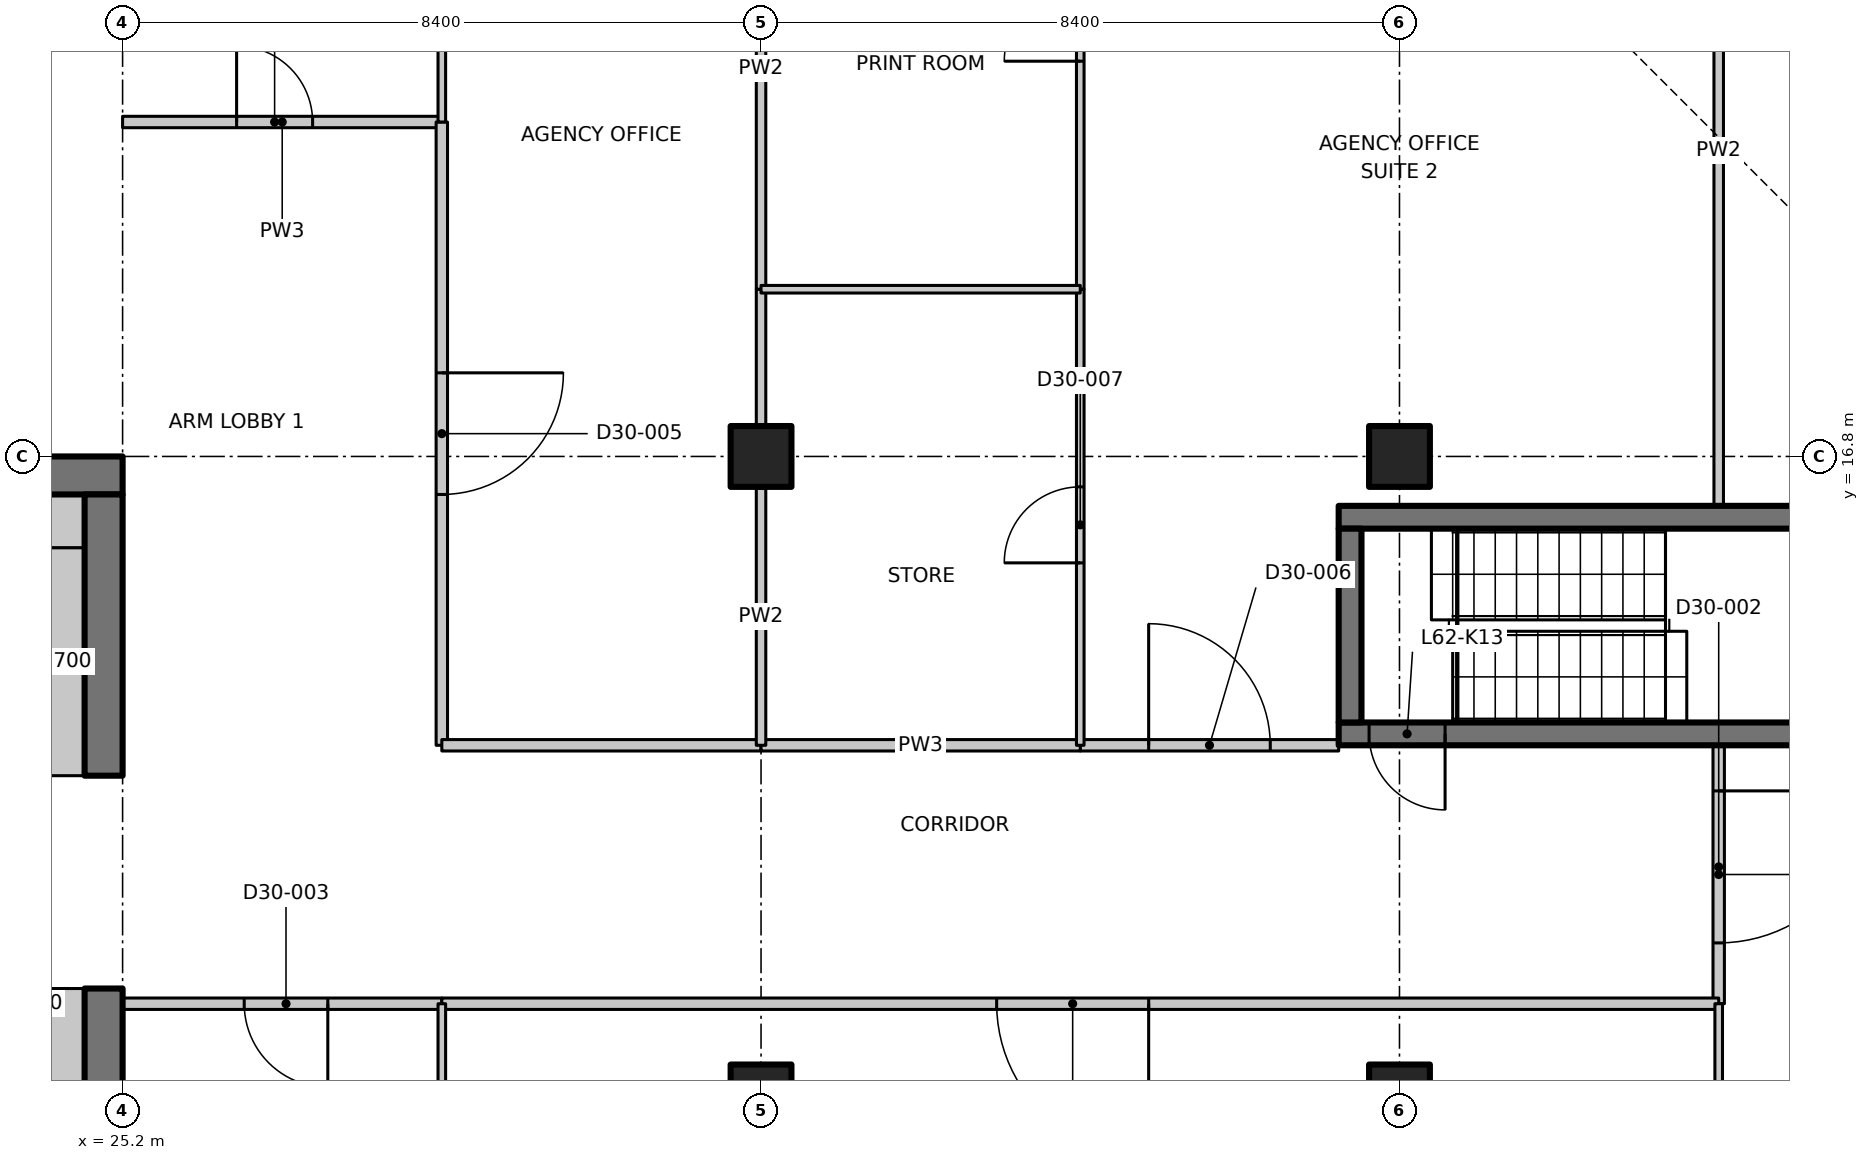
"""IFC4 building model, lengths in metres.
Left out: names, types, materials, properties, quantities, classifications, styles, units other than length and angle.
Written with IfcOpenShell. Run it as: python <this file> out.ifc"""

import sys

from ifc_helpers import new_model, si_unit, direction, frame, frame_2d, origin, origin_2d, place, context, subcontext, project, spatial, polyline, rectangle, outline, extrude, element, fill, save


model = new_model("IFC4")
c1 = context("Model", 3, precision=1e-05, world=origin(), true_north=direction((0.0, 1.0)))
c2 = subcontext(c1, "Body", "Model", "MODEL_VIEW")
j1 = project(units=[si_unit("LENGTHUNIT", "METRE"), si_unit("PLANEANGLEUNIT", "RADIAN")], contexts=[c1])
p1 = place(None, origin())
s1 = spatial("IfcSite", under=j1, at=p1, CompositionType="ELEMENT")
p2 = place(p1, origin())
s2 = spatial("IfcBuilding", under=s1, at=p2, CompositionType="ELEMENT")
p3 = place(p2, frame((0.0, 0.0, 244.5)))
s3 = spatial("IfcBuildingStorey", under=s2, at=p3, CompositionType="ELEMENT", Elevation=244.5)
for number, where, z_axis, x_axis in (
    (1, (33.6, 8.4, 0.0), (0.0, 0.0, 1.0), (1.0, 0.0, 0.0)),
    (2, (33.6, 16.8, 0.0), (0.0, 0.0, 1.0), (1.0, 0.0, 0.0)),
    (3, (42.0, 8.4, 0.0), (0.0, 0.0, 1.0), (1.0, 0.0, 0.0)),
    (4, (42.0, 16.8, 0.0), (0.0, 0.0, 1.0), (1.0, 0.0, 0.0)),
):
    element("IfcColumn", number, at=place(p3, frame(where, z_axis=z_axis, x_axis=x_axis)), inside=s3, PredefinedType="COLUMN", context=c2, shape_type="SweptSolid", body=[
        extrude(rectangle(XDim=0.8, YDim=0.8, at=origin_2d()), origin(), (0.0, 0.0, 1.0), 3.35),
    ])
p4 = place(p3, frame((23.8, 16.55, 0.0), z_axis=(0.0, 0.0, 1.0), x_axis=(1.0, 0.0, 0.0)))
e5 = element("IfcWall", 5, at=p4, inside=s3, PredefinedType="SHEAR", context=c2, shape_type="SweptSolid", body=[
    extrude(rectangle(XDim=1.4, YDim=0.5, at=frame_2d((0.7, 0.0))), origin(), (0.0, 0.0, 1.0), 3.35),
])
p5 = place(p3, frame((24.95, 0.5, 0.0), z_axis=(0.0, 0.0, 1.0), x_axis=(0.0, 1.0, 0.0)))
e6 = element("IfcWall", 6, at=p5, inside=s3, PredefinedType="SHEAR", context=c2, shape_type="SweptSolid", body=[
    extrude(rectangle(XDim=9.3, YDim=0.5, at=frame_2d((4.65, 0.0))), origin(), (0.0, 0.0, 1.0), 3.35),
])
p6 = place(p3, frame((24.95, 12.6, 0.0), z_axis=(0.0, 0.0, 1.0), x_axis=(0.0, 1.0, 0.0)))
e7 = element("IfcWall", 7, at=p6, inside=s3, PredefinedType="SHEAR", context=c2, shape_type="SweptSolid", body=[
    extrude(rectangle(XDim=3.7, YDim=0.5, at=frame_2d((1.85, 0.0))), origin(), (0.0, 0.0, 1.0), 3.35),
])
p7 = place(p3, frame((24.35, 12.6, 0.0), z_axis=(0.0, 0.0, 1.0), x_axis=(0.0, 1.0, 0.0)))
e8 = element("IfcWall", 8, at=p7, inside=s3, PredefinedType="PARTITIONING", context=c2, shape_type="SweptSolid", body=[
    extrude(rectangle(XDim=3.0, YDim=0.7, at=frame_2d((1.5, 0.0))), origin(), (0.0, 0.0, 1.0), 3.35),
])
p8 = place(p3, frame((23.8, 15.95, 0.0), z_axis=(0.0, 0.0, 1.0), x_axis=(1.0, 0.0, 0.0)))
e9 = element("IfcWall", 9, at=p8, inside=s3, PredefinedType="PARTITIONING", context=c2, shape_type="SweptSolid", body=[
    extrude(rectangle(XDim=0.9, YDim=0.7, at=frame_2d((0.45, 0.0))), origin(), (0.0, 0.0, 1.0), 3.35),
])
p9 = place(p3, frame((49.4, 13.15, 0.0), z_axis=(0.0, 0.0, 1.0), x_axis=(-1.0, 0.0, 0.0)))
e10 = element("IfcWall", 10, at=p9, inside=s3, PredefinedType="SHEAR", context=c2, shape_type="SweptSolid", body=[
    extrude(rectangle(XDim=8.2, YDim=0.3, at=frame_2d((4.1, 0.0))), origin(), (0.0, 0.0, 1.0), 3.35),
])
p10 = place(p9, frame((6.8, 0.0, 0.0)))
e11 = element("IfcOpeningElement", 11, at=p10, cuts=e10, PredefinedType="OPENING", context=c2, shape_type="SweptSolid", body=[
    extrude(rectangle(XDim=1.0, YDim=2.1, at=frame_2d((0.5, 1.05))), frame((0.0, 0.16, 0.0), z_axis=(0.0, -1.0, 0.0), x_axis=(1.0, 0.0, 0.0)), (0.0, 0.0, 1.0), 0.32),
])
p11 = place(p3, frame((41.2, 16.0, 0.0), z_axis=(0.0, 0.0, 1.0), x_axis=(1.0, 0.0, 0.0)))
e12 = element("IfcWall", 12, at=p11, inside=s3, PredefinedType="SHEAR", context=c2, shape_type="SweptSolid", body=[
    extrude(rectangle(XDim=8.2, YDim=0.3, at=frame_2d((4.1, 0.0))), origin(), (0.0, 0.0, 1.0), 3.35),
])
p12 = place(p3, frame((41.35, 13.3, 0.0), z_axis=(0.0, 0.0, 1.0), x_axis=(0.0, 1.0, 0.0)))
e13 = element("IfcWall", 13, at=p12, inside=s3, PredefinedType="SHEAR", context=c2, shape_type="SweptSolid", body=[
    extrude(rectangle(XDim=2.55, YDim=0.3, at=frame_2d((1.275, 0.0))), origin(), (0.0, 0.0, 1.0), 3.35),
])
p13 = place(p3, frame((24.35, 4.35, 0.0), z_axis=(0.0, 0.0, 1.0), x_axis=(0.0, 1.0, 0.0)))
e14 = element("IfcWall", 14, at=p13, inside=s3, PredefinedType="PARTITIONING", context=c2, shape_type="SweptSolid", body=[
    extrude(rectangle(XDim=5.45, YDim=0.7, at=frame_2d((2.725, 0.0))), origin(), (0.0, 0.0, 1.0), 3.35),
])
p14 = place(p3, frame((25.2, 21.2, 0.0), z_axis=(0.0, 0.0, 1.0), x_axis=(1.0, 0.0, 0.0)))
e15 = element("IfcWall", 15, at=p14, inside=s3, PredefinedType="PARTITIONING", context=c2, shape_type="SweptSolid", body=[
    extrude(rectangle(XDim=4.2, YDim=0.15, at=frame_2d((2.1, 0.0))), origin(), (0.0, 0.0, 1.0), 3.33),
])
p15 = place(p14, frame((1.5, 0.0, 0.0)))
e16 = element("IfcOpeningElement", 16, at=p15, cuts=e15, PredefinedType="OPENING", context=c2, shape_type="SweptSolid", body=[
    extrude(rectangle(XDim=1.0, YDim=2.1, at=frame_2d((0.5, 1.05))), frame((0.0, 0.085, 0.0), z_axis=(0.0, -1.0, 0.0), x_axis=(1.0, 0.0, 0.0)), (0.0, 0.0, 1.0), 0.17),
])
p16 = place(p3, frame((29.4, 9.6, 0.0), z_axis=(0.0, 0.0, 1.0), x_axis=(-1.0, 0.0, 0.0)))
e17 = element("IfcWall", 17, at=p16, inside=s3, PredefinedType="PARTITIONING", context=c2, shape_type="SweptSolid", body=[
    extrude(rectangle(XDim=4.2, YDim=0.15, at=frame_2d((2.1, 0.0))), origin(), (0.0, 0.0, 1.0), 3.33),
])
p17 = place(p16, frame((1.5, 0.0, 0.0)))
e18 = element("IfcOpeningElement", 18, at=p17, cuts=e17, PredefinedType="OPENING", context=c2, shape_type="SweptSolid", body=[
    extrude(rectangle(XDim=1.1, YDim=2.1, at=frame_2d((0.55, 1.05))), frame((0.0, 0.085, 0.0), z_axis=(0.0, -1.0, 0.0), x_axis=(1.0, 0.0, 0.0)), (0.0, 0.0, 1.0), 0.17),
])
p18 = place(p3, frame((29.4, 21.2, 0.0), z_axis=(0.0, 0.0, 1.0), x_axis=(0.0, -1.0, 0.0)))
e19 = element("IfcWall", 19, at=p18, inside=s3, PredefinedType="PARTITIONING", context=c2, shape_type="SweptSolid", body=[
    extrude(rectangle(XDim=8.2, YDim=0.15, at=frame_2d((4.1, 0.0))), origin(), (0.0, 0.0, 1.0), 3.33),
])
p19 = place(p18, frame((3.3, 0.0, 0.0)))
e20 = element("IfcOpeningElement", 20, at=p19, cuts=e19, PredefinedType="OPENING", context=c2, shape_type="SweptSolid", body=[
    extrude(rectangle(XDim=1.6, YDim=2.1, at=frame_2d((0.8, 1.05))), frame((0.0, 0.085, 0.0), z_axis=(0.0, -1.0, 0.0), x_axis=(1.0, 0.0, 0.0)), (0.0, 0.0, 1.0), 0.17),
])
p20 = place(p3, frame((29.4, 27.429, 0.0), z_axis=(0.0, 0.0, 1.0), x_axis=(0.0, -1.0, 0.0)))
e21 = element("IfcWall", 21, at=p20, inside=s3, PredefinedType="PARTITIONING", context=c2, shape_type="SweptSolid", body=[
    extrude(outline(polyline([(0.0, 0.0), (6.229, 0.0), (6.229, 3.33), (2.679, 3.33), (2.677, 2.98), (1.781, 2.98), (1.779, 3.33), (0.154, 3.33), (0.0, 3.33), (0.0, 0.0)])), frame((0.0, 0.05, 0.0), z_axis=(0.0, -1.0, 0.0), x_axis=(1.0, 0.0, 0.0)), (0.0, 0.0, 1.0), 0.1),
])
p21 = place(p3, frame((46.2, 13.0, 0.0), z_axis=(0.0, 0.0, 1.0), x_axis=(0.0, -1.0, 0.0)))
e22 = element("IfcWall", 22, at=p21, inside=s3, PredefinedType="PARTITIONING", context=c2, shape_type="SweptSolid", body=[
    extrude(rectangle(XDim=3.4, YDim=0.15, at=frame_2d((1.7, 0.0))), origin(), (0.0, 0.0, 1.0), 3.33),
])
p22 = place(p21, frame((0.6, 0.0, 0.0)))
e23 = element("IfcOpeningElement", 23, at=p22, cuts=e22, PredefinedType="OPENING", context=c2, shape_type="SweptSolid", body=[
    extrude(rectangle(XDim=2.0, YDim=2.4, at=frame_2d((1.0, 1.2))), frame((0.0, 0.085, 0.0), z_axis=(0.0, -1.0, 0.0), x_axis=(1.0, 0.0, 0.0)), (0.0, 0.0, 1.0), 0.17),
])
p23 = place(p3, frame((46.2, 9.6, 0.0), z_axis=(0.0, 0.0, 1.0), x_axis=(-1.0, 0.0, 0.0)))
e24 = element("IfcWall", 24, at=p23, inside=s3, PredefinedType="PARTITIONING", context=c2, shape_type="SweptSolid", body=[
    extrude(rectangle(XDim=16.8, YDim=0.15, at=frame_2d((8.4, 0.0))), origin(), (0.0, 0.0, 1.0), 3.33),
])
p24 = place(p23, frame((7.5, 0.0, 0.0)))
e25 = element("IfcOpeningElement", 25, at=p24, cuts=e24, PredefinedType="OPENING", context=c2, shape_type="SweptSolid", body=[
    extrude(rectangle(XDim=2.0, YDim=2.4, at=frame_2d((1.0, 1.2))), frame((0.0, 0.085, 0.0), z_axis=(0.0, -1.0, 0.0), x_axis=(1.0, 0.0, 0.0)), (0.0, 0.0, 1.0), 0.17),
])
p25 = place(p3, frame((29.4, 13.0, 0.0), z_axis=(0.0, 0.0, 1.0), x_axis=(1.0, 0.0, 0.0)))
e26 = element("IfcWall", 26, at=p25, inside=s3, PredefinedType="PARTITIONING", context=c2, shape_type="SweptSolid", body=[
    extrude(rectangle(XDim=4.2, YDim=0.15, at=frame_2d((2.1, 0.0))), origin(), (0.0, 0.0, 1.0), 3.33),
])
p26 = place(p3, frame((37.8, 13.0, 0.0), z_axis=(0.0, 0.0, 1.0), x_axis=(1.0, 0.0, 0.0)))
e27 = element("IfcWall", 27, at=p26, inside=s3, PredefinedType="PARTITIONING", context=c2, shape_type="SweptSolid", body=[
    extrude(rectangle(XDim=3.4, YDim=0.15, at=frame_2d((1.7, 0.0))), origin(), (0.0, 0.0, 1.0), 3.33),
])
p27 = place(p26, frame((0.9, 0.0, 0.0)))
e28 = element("IfcOpeningElement", 28, at=p27, cuts=e27, PredefinedType="OPENING", context=c2, shape_type="SweptSolid", body=[
    extrude(rectangle(XDim=1.6, YDim=2.1, at=frame_2d((0.8, 1.05))), frame((0.0, 0.085, 0.0), z_axis=(0.0, -1.0, 0.0), x_axis=(1.0, 0.0, 0.0)), (0.0, 0.0, 1.0), 0.17),
])
p28 = place(p3, frame((33.6, 13.0, 0.0), z_axis=(0.0, 0.0, 1.0), x_axis=(1.0, 0.0, 0.0)))
e29 = element("IfcWall", 29, at=p28, inside=s3, PredefinedType="PARTITIONING", context=c2, shape_type="SweptSolid", body=[
    extrude(rectangle(XDim=4.2, YDim=0.15, at=frame_2d((2.1, 0.0))), origin(), (0.0, 0.0, 1.0), 3.33),
])
p29 = place(p3, frame((46.2, -0.2, 0.0), z_axis=(0.0, 0.0, 1.0), x_axis=(0.0, 1.0, 0.0)))
e30 = element("IfcWall", 30, at=p29, inside=s3, PredefinedType="PARTITIONING", context=c2, shape_type="SweptSolid", body=[
    extrude(outline(polyline([(0.0, 0.0), (9.8, 0.0), (9.8, 3.33), (5.066, 3.33), (5.064, 2.98), (3.736, 2.98), (3.734, 3.33), (0.0, 3.33), (0.0, 0.0)])), frame((0.0, 0.05, 0.0), z_axis=(0.0, -1.0, 0.0), x_axis=(1.0, 0.0, 0.0)), (0.0, 0.0, 1.0), 0.1),
])
p30 = place(p3, frame((46.2, 16.15, 0.0), z_axis=(0.0, 0.0, 1.0), x_axis=(0.0, 1.0, 0.0)))
e31 = element("IfcWall", 31, at=p30, inside=s3, PredefinedType="PARTITIONING", context=c2, shape_type="SweptSolid", body=[
    extrude(outline(polyline([(0.0, 0.0), (9.353, 0.0), (9.353, 3.33), (9.25, 3.33), (5.528, 3.33), (5.526, 2.98), (4.174, 2.98), (4.172, 3.33), (0.0, 3.33), (0.0, 0.0)])), frame((0.0, 0.062, 0.0), z_axis=(0.0, -1.0, 0.0), x_axis=(1.0, 0.0, 0.0)), (0.0, 0.0, 1.0), 0.125),
])
p31 = place(p3, frame((29.4, 9.6, 0.0), z_axis=(0.0, 0.0, 1.0), x_axis=(0.0, -1.0, 0.0)))
e32 = element("IfcWall", 32, at=p31, inside=s3, PredefinedType="PARTITIONING", context=c2, shape_type="SweptSolid", body=[
    extrude(outline(polyline([(0.0, 0.0), (12.6, 0.0), (12.6, 3.33), (10.05, 3.33), (10.048, 2.98), (9.152, 2.98), (9.15, 3.33), (0.0, 3.33), (0.0, 0.0)])), frame((0.0, 0.05, 0.0), z_axis=(0.0, -1.0, 0.0), x_axis=(1.0, 0.0, 0.0)), (0.0, 0.0, 1.0), 0.1),
])
p32 = place(p3, frame((33.6, 19.0, 0.0), z_axis=(0.0, 0.0, 1.0), x_axis=(0.0, -1.0, 0.0)))
e33 = element("IfcWall", 33, at=p32, inside=s3, PredefinedType="PARTITIONING", context=c2, shape_type="SweptSolid", body=[
    extrude(rectangle(XDim=1.78, YDim=0.125, at=frame_2d((0.89, 0.0))), origin(), (0.0, 0.0, 1.0), 3.33),
])
p33 = place(p3, frame((33.6, 16.38, 0.0), z_axis=(0.0, 0.0, 1.0), x_axis=(0.0, -1.0, 0.0)))
e34 = element("IfcWall", 34, at=p33, inside=s3, PredefinedType="PARTITIONING", context=c2, shape_type="SweptSolid", body=[
    extrude(rectangle(XDim=3.38, YDim=0.125, at=frame_2d((1.69, 0.0))), origin(), (0.0, 0.0, 1.0), 3.33),
])
p34 = place(p3, frame((33.6, 24.805, 0.0), z_axis=(0.0, 0.0, 1.0), x_axis=(0.0, -1.0, 0.0)))
e35 = element("IfcWall", 35, at=p34, inside=s3, PredefinedType="PARTITIONING", context=c2, shape_type="SweptSolid", body=[
    extrude(outline(polyline([(0.0, 0.0), (5.805, 0.0), (5.805, 3.33), (0.055, 3.33), (0.053, 2.98), (0.0, 2.98), (0.0, 0.0)])), frame((0.0, 0.062, 0.0), z_axis=(0.0, -1.0, 0.0), x_axis=(1.0, 0.0, 0.0)), (0.0, 0.0, 1.0), 0.125),
])
p35 = place(p3, frame((37.8, 13.0, 0.0), z_axis=(0.0, 0.0, 1.0), x_axis=(0.0, 1.0, 0.0)))
e36 = element("IfcWall", 36, at=p35, inside=s3, PredefinedType="PARTITIONING", context=c2, shape_type="SweptSolid", body=[
    extrude(rectangle(XDim=6.0, YDim=0.1, at=frame_2d((3.0, 0.0))), origin(), (0.0, 0.0, 1.0), 3.33),
])
p36 = place(p35, frame((2.4, 0.0, 0.0)))
e37 = element("IfcOpeningElement", 37, at=p36, cuts=e36, PredefinedType="OPENING", context=c2, shape_type="SweptSolid", body=[
    extrude(rectangle(XDim=1.0, YDim=2.1, at=frame_2d((0.5, 1.05))), frame((0.0, 0.06, 0.0), z_axis=(0.0, -1.0, 0.0), x_axis=(1.0, 0.0, 0.0)), (0.0, 0.0, 1.0), 0.12),
])
p37 = place(p3, frame((37.8, 19.0, 0.0), z_axis=(0.0, 0.0, 1.0), x_axis=(0.0, 1.0, 0.0)))
e38 = element("IfcWall", 38, at=p37, inside=s3, PredefinedType="PARTITIONING", context=c2, shape_type="SweptSolid", body=[
    extrude(outline(polyline([(0.0, 0.0), (7.2, 0.0), (7.2, 3.33), (6.65, 3.33), (6.648, 2.98), (5.752, 2.98), (5.75, 3.33), (0.0, 3.33), (0.0, 0.0)])), frame((0.0, 0.05, 0.0), z_axis=(0.0, -1.0, 0.0), x_axis=(1.0, 0.0, 0.0)), (0.0, 0.0, 1.0), 0.1),
])
p38 = place(p37, frame((3.0, 0.0, 0.0)))
e39 = element("IfcOpeningElement", 39, at=p38, cuts=e38, PredefinedType="OPENING", context=c2, shape_type="SweptSolid", body=[
    extrude(rectangle(XDim=1.0, YDim=2.1, at=frame_2d((0.5, 1.05))), frame((0.0, 0.06, 0.0), z_axis=(0.0, -1.0, 0.0), x_axis=(1.0, 0.0, 0.0)), (0.0, 0.0, 1.0), 0.12),
])
p39 = place(p3, frame((33.6, 19.0, 0.0), z_axis=(0.0, 0.0, 1.0), x_axis=(1.0, 0.0, 0.0)))
e40 = element("IfcWall", 40, at=p39, inside=s3, PredefinedType="PARTITIONING", context=c2, shape_type="SweptSolid", body=[
    extrude(rectangle(XDim=4.2, YDim=0.1, at=frame_2d((2.1, 0.0))), origin(), (0.0, 0.0, 1.0), 3.33),
])
p40 = place(p10, origin())
e41 = element("IfcDoor", 41, at=p40, inside=s3, OperationType="SINGLE_SWING_LEFT", PredefinedType="DOOR", context=c2, shape_type="SweptSolid", body=[
    extrude(rectangle(XDim=1.0, YDim=2.1, at=frame_2d((0.5, 1.05))), frame((0.0, 0.025, 0.0), z_axis=(0.0, -1.0, 0.0), x_axis=(1.0, 0.0, 0.0)), (0.0, 0.0, 1.0), 0.05),
])
fill(e11, e41)
p41 = place(p15, origin())
e42 = element("IfcDoor", 42, at=p41, inside=s3, OperationType="SINGLE_SWING_LEFT", PredefinedType="DOOR", context=c2, shape_type="SweptSolid", body=[
    extrude(rectangle(XDim=1.0, YDim=2.1, at=frame_2d((0.5, 1.05))), frame((0.0, 0.025, 0.0), z_axis=(0.0, -1.0, 0.0), x_axis=(1.0, 0.0, 0.0)), (0.0, 0.0, 1.0), 0.05),
])
fill(e16, e42)
p42 = place(p22, origin())
e43 = element("IfcDoor", 43, at=p42, inside=s3, OperationType="DOUBLE_DOOR_SINGLE_SWING", PredefinedType="DOOR", context=c2, shape_type="SweptSolid", body=[
    extrude(rectangle(XDim=2.0, YDim=2.4, at=frame_2d((1.0, 1.2))), frame((0.0, 0.025, 0.0), z_axis=(0.0, -1.0, 0.0), x_axis=(1.0, 0.0, 0.0)), (0.0, 0.0, 1.0), 0.05),
])
fill(e23, e43)
p43 = place(p17, origin())
e44 = element("IfcDoor", 44, at=p43, inside=s3, OperationType="SINGLE_SWING_LEFT", PredefinedType="DOOR", context=c2, shape_type="SweptSolid", body=[
    extrude(rectangle(XDim=1.1, YDim=2.1, at=frame_2d((0.55, 1.05))), frame((0.0, 0.025, 0.0), z_axis=(0.0, -1.0, 0.0), x_axis=(1.0, 0.0, 0.0)), (0.0, 0.0, 1.0), 0.05),
])
fill(e18, e44)
p44 = place(p24, origin())
e45 = element("IfcDoor", 45, at=p44, inside=s3, OperationType="DOUBLE_DOOR_SINGLE_SWING", PredefinedType="DOOR", context=c2, shape_type="SweptSolid", body=[
    extrude(rectangle(XDim=2.0, YDim=2.4, at=frame_2d((1.0, 1.2))), frame((0.0, 0.025, 0.0), z_axis=(0.0, -1.0, 0.0), x_axis=(1.0, 0.0, 0.0)), (0.0, 0.0, 1.0), 0.05),
])
fill(e25, e45)
p45 = place(p19, origin())
e46 = element("IfcDoor", 46, at=p45, inside=s3, OperationType="DOUBLE_DOOR_SINGLE_SWING", PredefinedType="DOOR", context=c2, shape_type="SweptSolid", body=[
    extrude(rectangle(XDim=1.6, YDim=2.1, at=frame_2d((0.8, 1.05))), frame((0.0, 0.025, 0.0), z_axis=(0.0, -1.0, 0.0), x_axis=(1.0, 0.0, 0.0)), (0.0, 0.0, 1.0), 0.05),
])
fill(e20, e46)
p46 = place(p27, origin())
e47 = element("IfcDoor", 47, at=p46, inside=s3, OperationType="DOUBLE_DOOR_SINGLE_SWING", PredefinedType="DOOR", context=c2, shape_type="SweptSolid", body=[
    extrude(rectangle(XDim=1.6, YDim=2.1, at=frame_2d((0.8, 1.05))), frame((0.0, 0.025, 0.0), z_axis=(0.0, -1.0, 0.0), x_axis=(1.0, 0.0, 0.0)), (0.0, 0.0, 1.0), 0.05),
])
fill(e28, e47)
p47 = place(p36, origin())
e48 = element("IfcDoor", 48, at=p47, inside=s3, OperationType="SINGLE_SWING_LEFT", PredefinedType="DOOR", context=c2, shape_type="SweptSolid", body=[
    extrude(rectangle(XDim=1.0, YDim=2.1, at=frame_2d((0.5, 1.05))), frame((0.0, 0.025, 0.0), z_axis=(0.0, -1.0, 0.0), x_axis=(1.0, 0.0, 0.0)), (0.0, 0.0, 1.0), 0.05),
])
fill(e37, e48)
p48 = place(p38, origin())
e49 = element("IfcDoor", 49, at=p48, inside=s3, OperationType="SINGLE_SWING_LEFT", PredefinedType="DOOR", context=c2, shape_type="SweptSolid", body=[
    extrude(rectangle(XDim=1.0, YDim=2.1, at=frame_2d((0.5, 1.05))), frame((0.0, 0.025, 0.0), z_axis=(0.0, -1.0, 0.0), x_axis=(1.0, 0.0, 0.0)), (0.0, 0.0, 1.0), 0.05),
])
fill(e39, e49)
save(model, sys.argv[1])
